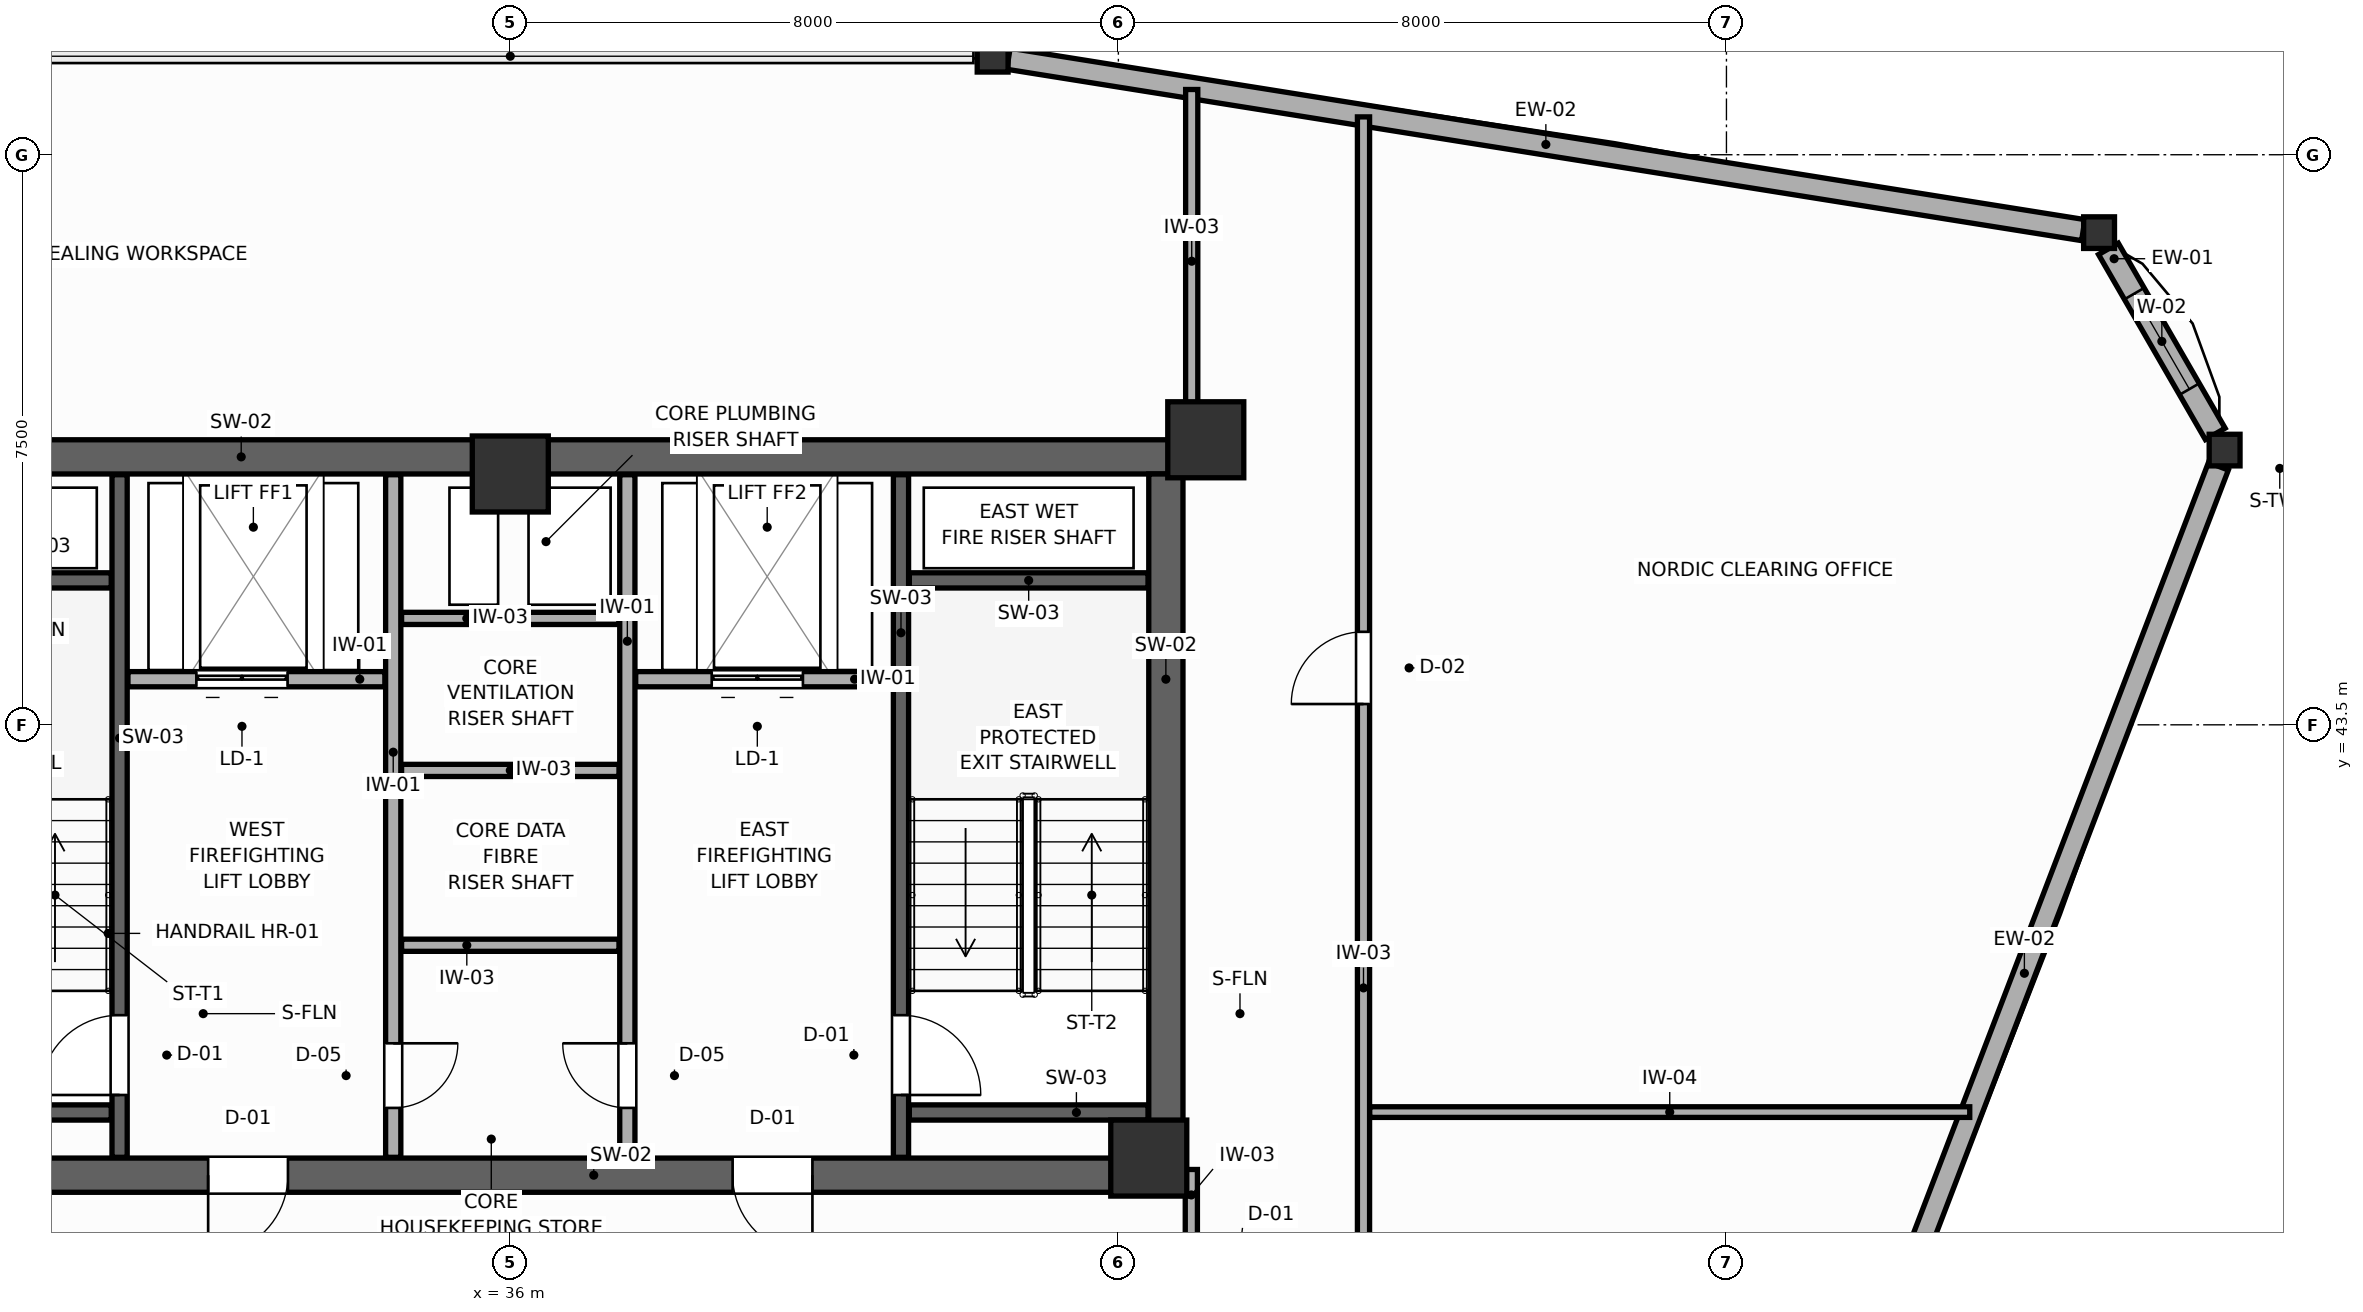
"""IFC4 building model, lengths in metres.
Left out: names, types, materials, properties, quantities, classifications, styles, units other than length and angle.
Written with IfcOpenShell. Run it as: python <this file> out.ifc"""

import sys

from ifc_helpers import new_model, si_unit, direction, frame, frame_2d, origin, origin_2d, place, context, subcontext, project, spatial, rectangle, i_section, extrude, source, transform, mapped, element, fill, save


model = new_model("IFC4")
c1 = context("Model", 3, precision=1e-05, world=origin(), true_north=direction((0.0, 1.0)))
c2 = subcontext(c1, "Body", "Model", "MODEL_VIEW")
j1 = project(units=[si_unit("LENGTHUNIT", "METRE"), si_unit("PLANEANGLEUNIT", "RADIAN")], contexts=[c1])
p1 = place(None, origin())
s1 = spatial("IfcSite", under=j1, at=p1, CompositionType="ELEMENT")
p2 = place(p1, origin())
s2 = spatial("IfcBuilding", under=s1, at=p2, CompositionType="ELEMENT")
p3 = place(p2, frame((0.0, 0.0, 172.2)))
s3 = spatial("IfcBuildingStorey", under=s2, at=p3, CompositionType="ELEMENT", Elevation=172.2)
p4 = place(p3, frame((27.15, 47.025, 0.0), z_axis=(0.0, 0.0, 1.0), x_axis=(1.0, 0.0, 0.0)))
e1 = element("IfcWall", 1, at=p4, inside=s3, PredefinedType="SHEAR", context=c2, shape_type="SweptSolid", body=[
    extrude(rectangle(XDim=17.7, YDim=0.45, at=frame_2d((8.85, 0.0))), origin(), (0.0, 0.0, 1.0), 3.6),
])
p5 = place(p3, frame((27.15, 37.575, 0.0), z_axis=(0.0, 0.0, 1.0), x_axis=(1.0, 0.0, 0.0)))
e2 = element("IfcWall", 2, at=p5, inside=s3, PredefinedType="SHEAR", context=c2, shape_type="SweptSolid", body=[
    extrude(rectangle(XDim=17.7, YDim=0.45, at=frame_2d((8.85, 0.0))), origin(), (0.0, 0.0, 1.0), 3.6),
])
p6 = place(p5, frame((4.875, 0.0, 0.0)))
e3 = element("IfcOpeningElement", 3, at=p6, cuts=e2, PredefinedType="OPENING", context=c2, shape_type="SweptSolid", body=[
    extrude(rectangle(XDim=1.05, YDim=2.1, at=frame_2d((0.525, 1.05))), frame((0.0, 0.235, 0.0), z_axis=(0.0, -1.0, 0.0), x_axis=(1.0, 0.0, 0.0)), (0.0, 0.0, 1.0), 0.47),
])
p7 = place(p5, frame((11.775, 0.0, 0.0)))
e4 = element("IfcOpeningElement", 4, at=p7, cuts=e2, PredefinedType="OPENING", context=c2, shape_type="SweptSolid", body=[
    extrude(rectangle(XDim=1.05, YDim=2.1, at=frame_2d((0.525, 1.05))), frame((0.0, 0.235, 0.0), z_axis=(0.0, -1.0, 0.0), x_axis=(1.0, 0.0, 0.0)), (0.0, 0.0, 1.0), 0.47),
])
p8 = place(p3, frame((44.625, 37.8, 0.0), z_axis=(0.0, 0.0, 1.0), x_axis=(0.0, 1.0, 0.0)))
e5 = element("IfcWall", 5, at=p8, inside=s3, PredefinedType="SHEAR", context=c2, shape_type="SweptSolid", body=[
    extrude(rectangle(XDim=9.0, YDim=0.45, at=frame_2d((4.5, 0.0))), origin(), (0.0, 0.0, 1.0), 3.6),
])
m1 = source(origin(), c2, "Body", "SweptSolid", [
    extrude(rectangle(XDim=1.0, YDim=1.0, at=origin_2d()), origin(), (0.0, 0.0, 1.0), 3.6),
])
for number, where, z_axis, x_axis in (
    (6, (45.15, 47.25, 0.0), (0.0, 0.0, 1.0), (1.0, 0.0, 0.0)),
    (7, (44.4, 37.8, 0.0), (0.0, 0.0, 1.0), (1.0, 0.0, 0.0)),
    (8, (36.0, 46.8, 0.0), (0.0, 0.0, 1.0), (1.0, 0.0, 0.0)),
):
    element("IfcColumn", number, at=place(p3, frame(where, z_axis=z_axis, x_axis=x_axis)), inside=s3, PredefinedType="COLUMN", context=c2, shape_type="MappedRepresentation", body=[
        mapped(m1, transform((0.0, 0.0, 0.0), scale=1.0)),
    ])
m2 = source(origin(), c2, "Body", "SweptSolid", [
    extrude(i_section(OverallWidth=0.406, OverallDepth=0.416, WebThickness=0.027, FlangeThickness=0.044, FilletRadius=0.015, at=origin_2d()), origin(), (0.0, 0.0, 1.0), 3.6),
])
for number, where, z_axis, x_axis in (
    (9, (58.554, 47.115, 0.0), (0.0, 0.0, 1.0), (1.0, 0.0, 0.0)),
    (10, (56.902, 49.975, 0.0), (0.0, 0.0, 1.0), (1.0, 0.0, 0.0)),
    (11, (42.346, 52.296, 0.0), (0.0, 0.0, 1.0), (1.0, 0.0, 0.0)),
):
    element("IfcColumn", number, at=place(p3, frame(where, z_axis=z_axis, x_axis=x_axis)), inside=s3, PredefinedType="COLUMN", context=c2, shape_type="MappedRepresentation", body=[
        mapped(m2, transform((0.0, 0.0, 0.0), scale=1.0)),
    ])
p9 = place(p3, frame((58.431, 47.327, 0.0), z_axis=(0.0, 0.0, 1.0), x_axis=(-0.499978056798, 0.866038072327, 0.0)))
e12 = element("IfcWall", 12, at=p9, inside=s3, PredefinedType="SOLIDWALL", context=c2, shape_type="SweptSolid", body=[
    extrude(rectangle(XDim=2.811, YDim=0.3, at=frame_2d((1.406, 0.0))), origin(), (0.0, 0.0, 1.0), 3.01),
])
p10 = place(p9, frame((0.681, 0.0, 0.75)))
e13 = element("IfcOpeningElement", 13, at=p10, cuts=e12, PredefinedType="OPENING", context=c2, shape_type="SweptSolid", body=[
    extrude(rectangle(XDim=1.45, YDim=1.65, at=frame_2d((0.725, 0.825))), frame((0.0, 0.16, 0.0), z_axis=(0.0, -1.0, 0.0), x_axis=(1.0, 0.0, 0.0)), (0.0, 0.0, 1.0), 0.32),
])
p11 = place(p3, frame((56.694, 50.008, 0.0), z_axis=(0.0, 0.0, 1.0), x_axis=(-0.987528363291, 0.157441200757, 0.0)))
e14 = element("IfcWall", 14, at=p11, inside=s3, PredefinedType="SOLIDWALL", context=c2, shape_type="SweptSolid", body=[
    extrude(rectangle(XDim=14.319, YDim=0.28, at=frame_2d((7.159, 0.0))), origin(), (0.0, 0.0, 1.0), 3.01),
])
p12 = place(p3, frame((53.367, 33.561, 0.0), z_axis=(0.0, 0.0, 1.0), x_axis=(0.357407179744, 0.933948664471, 0.0)))
e15 = element("IfcWall", 15, at=p12, inside=s3, PredefinedType="SOLIDWALL", context=c2, shape_type="SweptSolid", body=[
    extrude(rectangle(XDim=14.284, YDim=0.28, at=frame_2d((7.142, 0.0))), origin(), (0.0, 0.0, 1.0), 3.01),
])
p13 = place(p3, frame((30.86, 37.81, 0.0), z_axis=(0.0, 0.0, 1.0), x_axis=(0.0, 1.0, 0.0)))
e16 = element("IfcWall", 16, at=p13, inside=s3, PredefinedType="SHEAR", context=c2, shape_type="SweptSolid", body=[
    extrude(rectangle(XDim=8.98, YDim=0.2, at=frame_2d((4.49, 0.0))), origin(), (0.0, 0.0, 1.0), 3.6),
])
p14 = place(p13, frame((0.82, 0.0, 0.0)))
e17 = element("IfcOpeningElement", 17, at=p14, cuts=e16, PredefinedType="OPENING", context=c2, shape_type="SweptSolid", body=[
    extrude(rectangle(XDim=1.05, YDim=2.1, at=frame_2d((0.525, 1.05))), frame((0.0, 0.11, 0.0), z_axis=(0.0, -1.0, 0.0), x_axis=(1.0, 0.0, 0.0)), (0.0, 0.0, 1.0), 0.22),
])
for number, where, z_axis, x_axis in (
    (18, (27.61, 45.4, 0.0), (0.0, 0.0, 1.0), (1.0, 0.0, 0.0)),
    (19, (27.61, 38.4, 0.0), (0.0, 0.0, 1.0), (1.0, 0.0, 0.0)),
):
    element("IfcWall", number, at=place(p3, frame(where, z_axis=z_axis, x_axis=x_axis)), inside=s3, PredefinedType="SHEAR", context=c2, shape_type="SweptSolid", body=[
        extrude(rectangle(XDim=3.14, YDim=0.2, at=frame_2d((1.57, 0.0))), origin(), (0.0, 0.0, 1.0), 3.6),
    ])
p15 = place(p3, frame((41.14, 37.81, 0.0), z_axis=(0.0, 0.0, 1.0), x_axis=(0.0, 1.0, 0.0)))
e20 = element("IfcWall", 20, at=p15, inside=s3, PredefinedType="SHEAR", context=c2, shape_type="SweptSolid", body=[
    extrude(rectangle(XDim=8.98, YDim=0.2, at=frame_2d((4.49, 0.0))), origin(), (0.0, 0.0, 1.0), 3.6),
])
p16 = place(p15, frame((0.82, 0.0, 0.0)))
e21 = element("IfcOpeningElement", 21, at=p16, cuts=e20, PredefinedType="OPENING", context=c2, shape_type="SweptSolid", body=[
    extrude(rectangle(XDim=1.05, YDim=2.1, at=frame_2d((0.525, 1.05))), frame((0.0, 0.11, 0.0), z_axis=(0.0, -1.0, 0.0), x_axis=(1.0, 0.0, 0.0)), (0.0, 0.0, 1.0), 0.22),
])
for number, where, z_axis, x_axis in (
    (22, (41.25, 45.4, 0.0), (0.0, 0.0, 1.0), (1.0, 0.0, 0.0)),
    (23, (41.25, 38.4, 0.0), (0.0, 0.0, 1.0), (1.0, 0.0, 0.0)),
):
    element("IfcWall", number, at=place(p3, frame(where, z_axis=z_axis, x_axis=x_axis)), inside=s3, PredefinedType="SHEAR", context=c2, shape_type="SweptSolid", body=[
        extrude(rectangle(XDim=3.14, YDim=0.2, at=frame_2d((1.57, 0.0))), origin(), (0.0, 0.0, 1.0), 3.6),
    ])
p17 = place(p3, frame((30.97, 44.1, 0.0), z_axis=(0.0, 0.0, 1.0), x_axis=(1.0, 0.0, 0.0)))
e24 = element("IfcWall", 24, at=p17, inside=s3, PredefinedType="PARTITIONING", context=c2, shape_type="SweptSolid", body=[
    extrude(rectangle(XDim=3.38, YDim=0.2, at=frame_2d((1.69, 0.0))), origin(), (0.0, 0.0, 1.0), 3.4),
])
p18 = place(p17, frame((0.9, 0.0, 0.0)))
e25 = element("IfcOpeningElement", 25, at=p18, cuts=e24, PredefinedType="OPENING", context=c2, shape_type="SweptSolid", body=[
    extrude(rectangle(XDim=1.2, YDim=2.1, at=frame_2d((0.6, 1.05))), frame((0.0, 0.11, 0.0), z_axis=(0.0, -1.0, 0.0), x_axis=(1.0, 0.0, 0.0)), (0.0, 0.0, 1.0), 0.22),
])
p19 = place(p3, frame((37.65, 44.1, 0.0), z_axis=(0.0, 0.0, 1.0), x_axis=(1.0, 0.0, 0.0)))
e26 = element("IfcWall", 26, at=p19, inside=s3, PredefinedType="PARTITIONING", context=c2, shape_type="SweptSolid", body=[
    extrude(rectangle(XDim=3.38, YDim=0.2, at=frame_2d((1.69, 0.0))), origin(), (0.0, 0.0, 1.0), 3.4),
])
p20 = place(p19, frame((1.0, 0.0, 0.0)))
e27 = element("IfcOpeningElement", 27, at=p20, cuts=e26, PredefinedType="OPENING", context=c2, shape_type="SweptSolid", body=[
    extrude(rectangle(XDim=1.2, YDim=2.1, at=frame_2d((0.6, 1.05))), frame((0.0, 0.11, 0.0), z_axis=(0.0, -1.0, 0.0), x_axis=(1.0, 0.0, 0.0)), (0.0, 0.0, 1.0), 0.22),
])
p21 = place(p3, frame((34.46, 37.81, 0.0), z_axis=(0.0, 0.0, 1.0), x_axis=(0.0, 1.0, 0.0)))
e28 = element("IfcWall", 28, at=p21, inside=s3, PredefinedType="PARTITIONING", context=c2, shape_type="SweptSolid", body=[
    extrude(rectangle(XDim=8.98, YDim=0.2, at=frame_2d((4.49, 0.0))), origin(), (0.0, 0.0, 1.0), 3.4),
])
p22 = place(p21, frame((0.65, 0.0, 0.0)))
e29 = element("IfcOpeningElement", 29, at=p22, cuts=e28, PredefinedType="OPENING", context=c2, shape_type="SweptSolid", body=[
    extrude(rectangle(XDim=0.85, YDim=2.05, at=frame_2d((0.425, 1.025))), frame((0.0, 0.11, 0.0), z_axis=(0.0, -1.0, 0.0), x_axis=(1.0, 0.0, 0.0)), (0.0, 0.0, 1.0), 0.22),
])
p23 = place(p3, frame((37.54, 37.81, 0.0), z_axis=(0.0, 0.0, 1.0), x_axis=(0.0, 1.0, 0.0)))
e30 = element("IfcWall", 30, at=p23, inside=s3, PredefinedType="PARTITIONING", context=c2, shape_type="SweptSolid", body=[
    extrude(rectangle(XDim=8.98, YDim=0.2, at=frame_2d((4.49, 0.0))), origin(), (0.0, 0.0, 1.0), 3.4),
])
p24 = place(p23, frame((0.65, 0.0, 0.0)))
e31 = element("IfcOpeningElement", 31, at=p24, cuts=e30, PredefinedType="OPENING", context=c2, shape_type="SweptSolid", body=[
    extrude(rectangle(XDim=0.85, YDim=2.05, at=frame_2d((0.425, 1.025))), frame((0.0, 0.11, 0.0), z_axis=(0.0, -1.0, 0.0), x_axis=(1.0, 0.0, 0.0)), (0.0, 0.0, 1.0), 0.22),
])
for number, where, z_axis, x_axis in (
    (32, (34.57, 40.6, 0.0), (0.0, 0.0, 1.0), (1.0, 0.0, 0.0)),
    (33, (34.57, 42.9, 0.0), (0.0, 0.0, 1.0), (1.0, 0.0, 0.0)),
    (34, (34.57, 44.9, 0.0), (0.0, 0.0, 1.0), (1.0, 0.0, 0.0)),
):
    element("IfcWall", number, at=place(p3, frame(where, z_axis=z_axis, x_axis=x_axis)), inside=s3, PredefinedType="PARTITIONING", context=c2, shape_type="SweptSolid", body=[
        extrude(rectangle(XDim=2.86, YDim=0.16, at=frame_2d((1.43, 0.0))), origin(), (0.0, 0.0, 1.0), 3.4),
    ])
p25 = place(p3, frame((44.96, 35.0, 0.0), z_axis=(0.0, 0.0, 1.0), x_axis=(0.0, 1.0, 0.0)))
e35 = element("IfcWall", 35, at=p25, inside=s3, PredefinedType="PARTITIONING", context=c2, shape_type="SweptSolid", body=[
    extrude(rectangle(XDim=2.65, YDim=0.16, at=frame_2d((1.325, 0.0))), origin(), (0.0, 0.0, 1.0), 3.4),
])
p26 = place(p25, frame((0.75, 0.0, 0.0)))
e36 = element("IfcOpeningElement", 36, at=p26, cuts=e35, PredefinedType="OPENING", context=c2, shape_type="SweptSolid", body=[
    extrude(rectangle(XDim=1.05, YDim=2.1, at=frame_2d((0.525, 1.05))), frame((0.0, 0.09, 0.0), z_axis=(0.0, -1.0, 0.0), x_axis=(1.0, 0.0, 0.0)), (0.0, 0.0, 1.0), 0.18),
])
p27 = place(p3, frame((47.225, 32.31, 0.0), z_axis=(0.0, 0.0, 1.0), x_axis=(0.0, 1.0, 0.0)))
e37 = element("IfcWall", 37, at=p27, inside=s3, PredefinedType="PARTITIONING", context=c2, shape_type="SweptSolid", body=[
    extrude(rectangle(XDim=19.188, YDim=0.16, at=frame_2d((9.594, 0.0))), origin(), (0.0, 0.0, 1.0), 3.4),
])
p28 = place(p27, frame((3.044, 0.0, 0.0)))
e38 = element("IfcOpeningElement", 38, at=p28, cuts=e37, PredefinedType="OPENING", context=c2, shape_type="SweptSolid", body=[
    extrude(rectangle(XDim=0.95, YDim=2.05, at=frame_2d((0.475, 1.025))), frame((0.0, 0.09, 0.0), z_axis=(0.0, -1.0, 0.0), x_axis=(1.0, 0.0, 0.0)), (0.0, 0.0, 1.0), 0.18),
])
p29 = place(p27, frame((11.463, 0.0, 0.0)))
e39 = element("IfcOpeningElement", 39, at=p29, cuts=e37, PredefinedType="OPENING", context=c2, shape_type="SweptSolid", body=[
    extrude(rectangle(XDim=0.95, YDim=2.05, at=frame_2d((0.475, 1.025))), frame((0.0, 0.09, 0.0), z_axis=(0.0, -1.0, 0.0), x_axis=(1.0, 0.0, 0.0)), (0.0, 0.0, 1.0), 0.18),
])
p30 = place(p3, frame((44.965, 47.34, 0.0), z_axis=(0.0, 0.0, 1.0), x_axis=(0.0, 1.0, 0.0)))
e40 = element("IfcWall", 40, at=p30, inside=s3, PredefinedType="PARTITIONING", context=c2, shape_type="SweptSolid", body=[
    extrude(rectangle(XDim=4.518, YDim=0.16, at=frame_2d((2.259, 0.0))), origin(), (0.0, 0.0, 1.0), 3.4),
])
p31 = place(p3, frame((47.307, 38.405, 0.0), z_axis=(0.0, 0.0, 1.0), x_axis=(1.0, 0.0, 0.0)))
e41 = element("IfcWall", 41, at=p31, inside=s3, PredefinedType="PARTITIONING", context=c2, shape_type="SweptSolid", body=[
    extrude(rectangle(XDim=7.894, YDim=0.14, at=frame_2d((3.947, 0.0))), origin(), (0.0, 0.0, 1.0), 3.4),
])
p32 = place(p10, origin())
e42 = element("IfcWindow", 42, at=p32, inside=s3, PartitioningType="SINGLE_PANEL", PredefinedType="WINDOW", context=c2, shape_type="SweptSolid", body=[
    extrude(rectangle(XDim=1.45, YDim=1.65, at=frame_2d((0.725, 0.825))), frame((0.0, 0.03, 0.0), z_axis=(0.0, -1.0, 0.0), x_axis=(1.0, 0.0, 0.0)), (0.0, 0.0, 1.0), 0.06),
])
fill(e13, e42)
p33 = place(p14, origin())
e43 = element("IfcDoor", 43, at=p33, inside=s3, OperationType="SINGLE_SWING_LEFT", PredefinedType="DOOR", context=c2, shape_type="SweptSolid", body=[
    extrude(rectangle(XDim=1.05, YDim=2.1, at=frame_2d((0.525, 1.05))), frame((0.0, 0.025, 0.0), z_axis=(0.0, -1.0, 0.0), x_axis=(1.0, 0.0, 0.0)), (0.0, 0.0, 1.0), 0.05),
])
fill(e17, e43)
p34 = place(p16, frame((1.05, 0.0, 0.0), z_axis=(0.0, 0.0, 1.0), x_axis=(-1.0, 0.0, 0.0)))
e44 = element("IfcDoor", 44, at=p34, inside=s3, OperationType="SINGLE_SWING_RIGHT", PredefinedType="DOOR", context=c2, shape_type="SweptSolid", body=[
    extrude(rectangle(XDim=1.05, YDim=2.1, at=frame_2d((0.525, 1.05))), frame((0.0, 0.025, 0.0), z_axis=(0.0, -1.0, 0.0), x_axis=(1.0, 0.0, 0.0)), (0.0, 0.0, 1.0), 0.05),
])
fill(e21, e44)
p35 = place(p18, origin())
e45 = element("IfcDoor", 45, at=p35, inside=s3, OperationType="DOUBLE_DOOR_SLIDING", PredefinedType="DOOR", context=c2, shape_type="SweptSolid", body=[
    extrude(rectangle(XDim=1.2, YDim=2.1, at=frame_2d((0.6, 1.05))), frame((0.0, 0.025, 0.0), z_axis=(0.0, -1.0, 0.0), x_axis=(1.0, 0.0, 0.0)), (0.0, 0.0, 1.0), 0.05),
])
fill(e25, e45)
p36 = place(p20, origin())
e46 = element("IfcDoor", 46, at=p36, inside=s3, OperationType="DOUBLE_DOOR_SLIDING", PredefinedType="DOOR", context=c2, shape_type="SweptSolid", body=[
    extrude(rectangle(XDim=1.2, YDim=2.1, at=frame_2d((0.6, 1.05))), frame((0.0, 0.025, 0.0), z_axis=(0.0, -1.0, 0.0), x_axis=(1.0, 0.0, 0.0)), (0.0, 0.0, 1.0), 0.05),
])
fill(e27, e46)
p37 = place(p22, frame((0.85, 0.0, 0.0), z_axis=(0.0, 0.0, 1.0), x_axis=(-1.0, 0.0, 0.0)))
e47 = element("IfcDoor", 47, at=p37, inside=s3, OperationType="SINGLE_SWING_LEFT", PredefinedType="DOOR", context=c2, shape_type="SweptSolid", body=[
    extrude(rectangle(XDim=0.85, YDim=2.05, at=frame_2d((0.425, 1.025))), frame((0.0, 0.025, 0.0), z_axis=(0.0, -1.0, 0.0), x_axis=(1.0, 0.0, 0.0)), (0.0, 0.0, 1.0), 0.05),
])
fill(e29, e47)
p38 = place(p24, origin())
e48 = element("IfcDoor", 48, at=p38, inside=s3, OperationType="SINGLE_SWING_RIGHT", PredefinedType="DOOR", context=c2, shape_type="SweptSolid", body=[
    extrude(rectangle(XDim=0.85, YDim=2.05, at=frame_2d((0.425, 1.025))), frame((0.0, 0.025, 0.0), z_axis=(0.0, -1.0, 0.0), x_axis=(1.0, 0.0, 0.0)), (0.0, 0.0, 1.0), 0.05),
])
fill(e31, e48)
p39 = place(p29, origin())
e49 = element("IfcDoor", 49, at=p39, inside=s3, OperationType="SINGLE_SWING_LEFT", PredefinedType="DOOR", context=c2, shape_type="SweptSolid", body=[
    extrude(rectangle(XDim=0.95, YDim=2.05, at=frame_2d((0.475, 1.025))), frame((0.0, 0.025, 0.0), z_axis=(0.0, -1.0, 0.0), x_axis=(1.0, 0.0, 0.0)), (0.0, 0.0, 1.0), 0.05),
])
fill(e39, e49)
p40 = place(p6, frame((1.05, 0.0, 0.0), z_axis=(0.0, 0.0, 1.0), x_axis=(-1.0, 0.0, 0.0)))
e50 = element("IfcDoor", 50, at=p40, inside=s3, OperationType="SINGLE_SWING_RIGHT", PredefinedType="DOOR", context=c2, shape_type="SweptSolid", body=[
    extrude(rectangle(XDim=1.05, YDim=2.1, at=frame_2d((0.525, 1.05))), frame((0.0, 0.025, 0.0), z_axis=(0.0, -1.0, 0.0), x_axis=(1.0, 0.0, 0.0)), (0.0, 0.0, 1.0), 0.05),
])
fill(e3, e50)
p41 = place(p7, frame((1.05, 0.0, 0.0), z_axis=(0.0, 0.0, 1.0), x_axis=(-1.0, 0.0, 0.0)))
e51 = element("IfcDoor", 51, at=p41, inside=s3, OperationType="SINGLE_SWING_LEFT", PredefinedType="DOOR", context=c2, shape_type="SweptSolid", body=[
    extrude(rectangle(XDim=1.05, YDim=2.1, at=frame_2d((0.525, 1.05))), frame((0.0, 0.025, 0.0), z_axis=(0.0, -1.0, 0.0), x_axis=(1.0, 0.0, 0.0)), (0.0, 0.0, 1.0), 0.05),
])
fill(e4, e51)
save(model, sys.argv[1])
